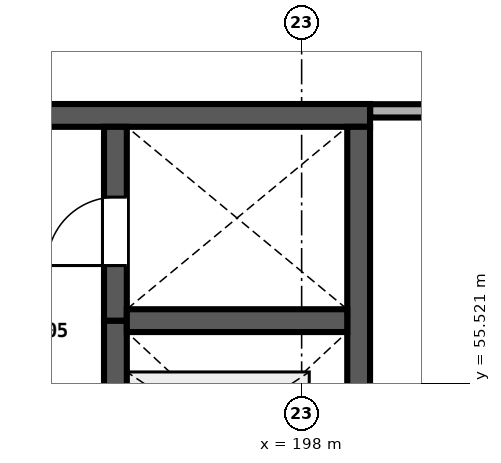
"""IFC4 building model, lengths in metres.
Left out: names, types, materials, properties, quantities, classifications, styles, units other than length and angle.
Written with IfcOpenShell. Run it as: python <this file> out.ifc"""

import sys

from ifc_helpers import new_model, si_unit, direction, frame, frame_2d, origin, place, context, subcontext, project, spatial, rectangle, extrude, element, fill, save


model = new_model("IFC4")
c1 = context("Model", 3, precision=1e-05, world=origin(), true_north=direction((0.0, 1.0)))
c2 = subcontext(c1, "Body", "Model", "MODEL_VIEW")
j1 = project(units=[si_unit("LENGTHUNIT", "METRE"), si_unit("PLANEANGLEUNIT", "RADIAN")], contexts=[c1])
p1 = place(None, origin())
s1 = spatial("IfcSite", under=j1, at=p1, CompositionType="ELEMENT")
p2 = place(p1, origin())
s2 = spatial("IfcBuilding", under=s1, at=p2, CompositionType="ELEMENT")
p3 = place(p2, frame((0.0, 0.0, 19.2)))
s3 = spatial("IfcBuildingStorey", under=s2, at=p3, CompositionType="ELEMENT", Elevation=19.2)
p4 = place(p3, frame((198.9, 59.05, 0.0), z_axis=(0.0, 0.0, 1.0), x_axis=(-1.0, 0.0, 0.0)))
e1 = element("IfcWall", 1, at=p4, inside=s3, PredefinedType="SHEAR", context=c2, shape_type="SweptSolid", body=[
    extrude(rectangle(XDim=18.0, YDim=0.3, at=frame_2d((9.0, 0.0))), origin(), (0.0, 0.0, 1.0), 4.555),
])
p5 = place(p4, frame((4.7, 0.0, 0.0)))
e2 = element("IfcOpeningElement", 2, at=p5, cuts=e1, PredefinedType="OPENING", context=c2, shape_type="SweptSolid", body=[
    extrude(rectangle(XDim=1.9, YDim=2.25, at=frame_2d((0.95, 1.125))), frame((0.0, 0.16, 0.0), z_axis=(0.0, -1.0, 0.0), x_axis=(1.0, 0.0, 0.0)), (0.0, 0.0, 1.0), 0.32),
])
p6 = place(p3, frame((198.75, 53.5, 0.0), z_axis=(0.0, 0.0, 1.0), x_axis=(0.0, 1.0, 0.0)))
e3 = element("IfcWall", 3, at=p6, inside=s3, PredefinedType="SHEAR", context=c2, shape_type="SweptSolid", body=[
    extrude(rectangle(XDim=5.4, YDim=0.3, at=frame_2d((2.7, 0.0))), origin(), (0.0, 0.0, 1.0), 4.555),
])
p7 = place(p3, frame((195.55, 53.5, 0.0), z_axis=(0.0, 0.0, 1.0), x_axis=(0.0, 1.0, 0.0)))
e4 = element("IfcWall", 4, at=p7, inside=s3, PredefinedType="SHEAR", context=c2, shape_type="SweptSolid", body=[
    extrude(rectangle(XDim=2.85, YDim=0.3, at=frame_2d((1.425, 0.0))), origin(), (0.0, 0.0, 1.0), 4.555),
])
p8 = place(p7, frame((0.775, 0.0, 0.0)))
e5 = element("IfcOpeningElement", 5, at=p8, cuts=e4, PredefinedType="OPENING", context=c2, shape_type="SweptSolid", body=[
    extrude(rectangle(XDim=1.1, YDim=2.1, at=frame_2d((0.55, 1.05))), frame((0.0, 0.16, 0.0), z_axis=(0.0, -1.0, 0.0), x_axis=(1.0, 0.0, 0.0)), (0.0, 0.0, 1.0), 0.32),
])
p9 = place(p3, frame((195.55, 56.35, 0.0), z_axis=(0.0, 0.0, 1.0), x_axis=(0.0, 1.0, 0.0)))
e6 = element("IfcWall", 6, at=p9, inside=s3, PredefinedType="SHEAR", context=c2, shape_type="SweptSolid", body=[
    extrude(rectangle(XDim=2.55, YDim=0.3, at=frame_2d((1.275, 0.0))), origin(), (0.0, 0.0, 1.0), 4.555),
])
p10 = place(p9, frame((0.725, 0.0, 0.0)))
e7 = element("IfcOpeningElement", 7, at=p10, cuts=e6, PredefinedType="OPENING", context=c2, shape_type="SweptSolid", body=[
    extrude(rectangle(XDim=0.9, YDim=2.1, at=frame_2d((0.45, 1.05))), frame((0.0, 0.16, 0.0), z_axis=(0.0, -1.0, 0.0), x_axis=(1.0, 0.0, 0.0)), (0.0, 0.0, 1.0), 0.32),
])
p11 = place(p3, frame((195.7, 56.35, 0.0), z_axis=(0.0, 0.0, 1.0), x_axis=(1.0, 0.0, 0.0)))
e8 = element("IfcWall", 8, at=p11, inside=s3, PredefinedType="SHEAR", context=c2, shape_type="SweptSolid", body=[
    extrude(rectangle(XDim=2.9, YDim=0.3, at=frame_2d((1.45, 0.0))), origin(), (0.0, 0.0, 1.0), 4.555),
])
p12 = place(p3, frame((198.902, 59.11, 0.0), z_axis=(0.0, 0.0, 1.0), x_axis=(1.0, 0.0, 0.0)))
e9 = element("IfcWall", 9, at=p12, inside=s3, PredefinedType="PARTITIONING", context=c2, shape_type="SweptSolid", body=[
    extrude(rectangle(XDim=2.038, YDim=0.175, at=frame_2d((1.019, 0.0))), origin(), (0.0, 0.0, 1.0), 3.28),
])
p13 = place(p10, origin())
e10 = element("IfcDoor", 10, at=p13, inside=s3, OperationType="SINGLE_SWING_LEFT", PredefinedType="DOOR", context=c2, shape_type="SweptSolid", body=[
    extrude(rectangle(XDim=0.9, YDim=2.1, at=frame_2d((0.45, 1.05))), frame((0.0, 0.025, 0.0), z_axis=(0.0, -1.0, 0.0), x_axis=(1.0, 0.0, 0.0)), (0.0, 0.0, 1.0), 0.05),
])
fill(e7, e10)
save(model, sys.argv[1])
